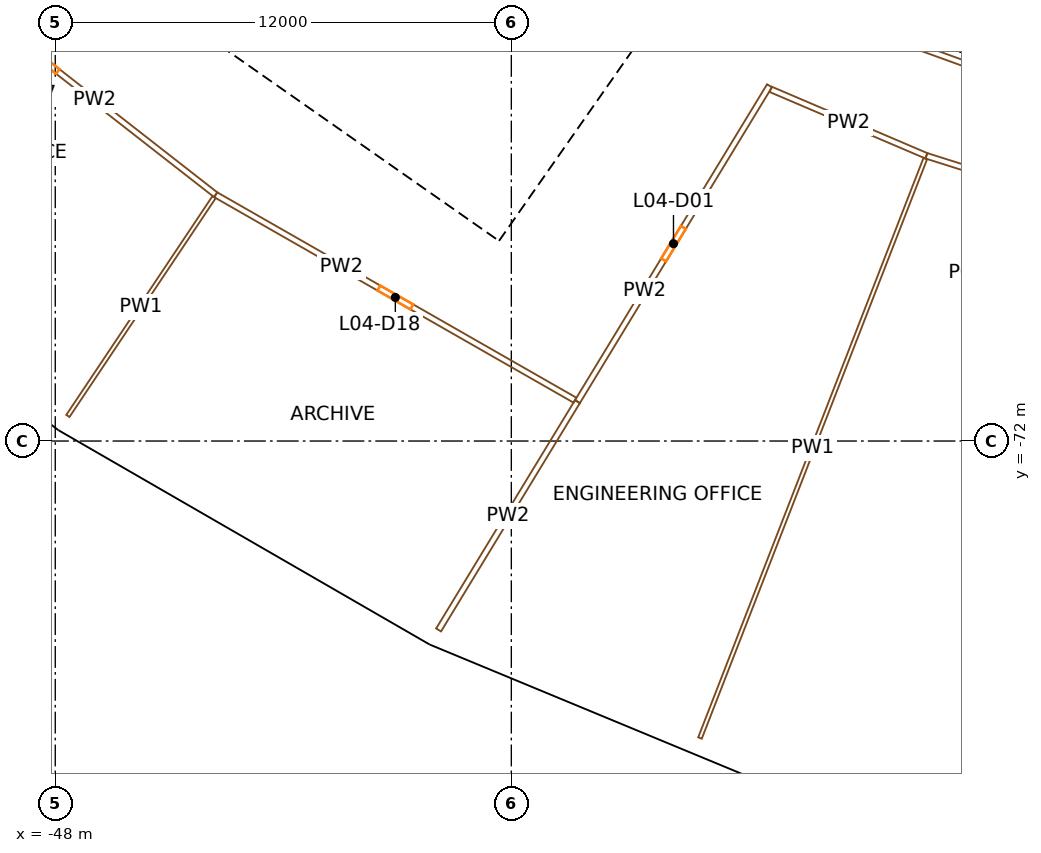
"""IFC4 building model, lengths in metres.
Left out: names, types, materials, properties, quantities, classifications, styles, units other than length and angle.
Written with IfcOpenShell. Run it as: python <this file> out.ifc"""

import sys

from ifc_helpers import new_model, si_unit, direction, frame, frame_2d, origin, origin_2d, place, context, subcontext, project, spatial, rectangle, extrude, element, fill, save


model = new_model("IFC4")
c1 = context("Model", 3, precision=1e-05, world=origin(), true_north=direction((0.0, 1.0)))
c2 = subcontext(c1, "Body", "Model", "MODEL_VIEW")
j1 = project(units=[si_unit("LENGTHUNIT", "METRE"), si_unit("PLANEANGLEUNIT", "RADIAN")], contexts=[c1])
p1 = place(None, origin())
s1 = spatial("IfcSite", under=j1, at=p1, CompositionType="ELEMENT")
p2 = place(p1, origin())
s2 = spatial("IfcBuilding", under=s1, at=p2, CompositionType="ELEMENT")
p3 = place(p2, frame((0.0, 0.0, 31.5)))
s3 = spatial("IfcBuildingStorey", under=s2, at=p3, CompositionType="ELEMENT", Elevation=31.5)
p4 = place(p3, frame((-43.196, -64.647, 0.0), z_axis=(0.0, 0.0, 1.0), x_axis=(0.831469612303, -0.55557023302, 0.0)))
e1 = element("IfcColumn", 1, at=p4, inside=s3, PredefinedType="COLUMN", context=c2, shape_type="SweptSolid", body=[
    extrude(rectangle(XDim=1.4, YDim=1.8, at=origin_2d()), origin(), (0.0, 0.0, 1.0), 4.5),
])
p5 = place(p3, frame((-47.362, -70.883, 0.0), z_axis=(0.0, 0.0, 1.0), x_axis=(0.831469612303, -0.55557023302, 0.0)))
e2 = element("IfcColumn", 2, at=p5, inside=s3, PredefinedType="COLUMN", context=c2, shape_type="SweptSolid", body=[
    extrude(rectangle(XDim=1.1, YDim=1.3, at=origin_2d()), origin(), (0.0, 0.0, 1.0), 4.5),
])
p6 = place(p3, frame((-34.388, -69.732, 0.0), z_axis=(0.0, 0.0, 1.0), x_axis=(0.896872741533, -0.442288690219, 0.0)))
e3 = element("IfcColumn", 3, at=p6, inside=s3, PredefinedType="COLUMN", context=c2, shape_type="SweptSolid", body=[
    extrude(rectangle(XDim=1.4, YDim=1.8, at=origin_2d()), origin(), (0.0, 0.0, 1.0), 4.5),
])
p7 = place(p3, frame((-37.705, -76.458, 0.0), z_axis=(0.0, 0.0, 1.0), x_axis=(0.896872741533, -0.442288690219, 0.0)))
e4 = element("IfcColumn", 4, at=p7, inside=s3, PredefinedType="COLUMN", context=c2, shape_type="SweptSolid", body=[
    extrude(rectangle(XDim=1.1, YDim=1.3, at=origin_2d()), origin(), (0.0, 0.0, 1.0), 4.5),
])
p8 = place(p3, frame((-24.992, -73.624, 0.0), z_axis=(0.0, 0.0, 1.0), x_axis=(0.946930129495, -0.321439465303, 0.0)))
e5 = element("IfcColumn", 5, at=p8, inside=s3, PredefinedType="COLUMN", context=c2, shape_type="SweptSolid", body=[
    extrude(rectangle(XDim=1.4, YDim=1.8, at=origin_2d()), origin(), (0.0, 0.0, 1.0), 4.5),
])
p9 = place(p3, frame((-27.403, -80.726, 0.0), z_axis=(0.0, 0.0, 1.0), x_axis=(0.946930129495, -0.321439465303, 0.0)))
e6 = element("IfcColumn", 6, at=p9, inside=s3, PredefinedType="COLUMN", context=c2, shape_type="SweptSolid", body=[
    extrude(rectangle(XDim=1.1, YDim=1.3, at=origin_2d()), origin(), (0.0, 0.0, 1.0), 4.5),
])
p10 = place(p3, frame((-36.717, -66.337, 0.0), z_axis=(0.0, 0.0, 1.0), x_axis=(0.573577477574, 0.819151315216, 0.0)))
e7 = element("IfcWall", 7, at=p10, inside=s3, PredefinedType="SHEAR", context=c2, shape_type="SweptSolid", body=[
    extrude(rectangle(XDim=14.8, YDim=0.9, at=frame_2d((7.4, 0.0))), origin(), (0.0, 0.0, 1.0), 4.1),
])
p11 = place(p10, frame((6.2, 0.0, 0.0)))
e8 = element("IfcOpeningElement", 8, at=p11, cuts=e7, PredefinedType="OPENING", context=c2, shape_type="SweptSolid", body=[
    extrude(rectangle(XDim=2.4, YDim=2.1, at=frame_2d((1.2, 1.05))), frame((0.0, 0.46, 0.0), z_axis=(0.0, -1.0, 0.0), x_axis=(1.0, 0.0, 0.0)), (0.0, 0.0, 1.0), 0.92),
])
p12 = place(p3, frame((-36.827, -65.71, 0.0), z_axis=(0.0, 0.0, 1.0), x_axis=(-0.819153391756, 0.573574511963, 0.0)))
e9 = element("IfcWall", 9, at=p12, inside=s3, PredefinedType="SHEAR", context=c2, shape_type="SweptSolid", body=[
    extrude(rectangle(XDim=15.045, YDim=0.9, at=frame_2d((7.523, 0.0))), origin(), (0.0, 0.0, 1.0), 4.1),
])
p13 = place(p12, frame((0.6, 0.0, 0.0)))
e10 = element("IfcOpeningElement", 10, at=p13, cuts=e9, PredefinedType="OPENING", context=c2, shape_type="SweptSolid", body=[
    extrude(rectangle(XDim=1.0, YDim=2.1, at=frame_2d((0.5, 1.05))), frame((0.0, 0.46, 0.0), z_axis=(0.0, -1.0, 0.0), x_axis=(1.0, 0.0, 0.0)), (0.0, 0.0, 1.0), 0.92),
])
p14 = place(p12, frame((3.275, 0.0, 0.0)))
e11 = element("IfcOpeningElement", 11, at=p14, cuts=e9, PredefinedType="OPENING", context=c2, shape_type="SweptSolid", body=[
    extrude(rectangle(XDim=1.0, YDim=2.1, at=frame_2d((0.5, 1.05))), frame((0.0, 0.46, 0.0), z_axis=(0.0, -1.0, 0.0), x_axis=(1.0, 0.0, 0.0)), (0.0, 0.0, 1.0), 0.92),
])
p15 = place(p12, frame((6.175, 0.0, 0.0)))
e12 = element("IfcOpeningElement", 12, at=p15, cuts=e9, PredefinedType="OPENING", context=c2, shape_type="SweptSolid", body=[
    extrude(rectangle(XDim=1.0, YDim=2.1, at=frame_2d((0.5, 1.05))), frame((0.0, 0.46, 0.0), z_axis=(0.0, -1.0, 0.0), x_axis=(1.0, 0.0, 0.0)), (0.0, 0.0, 1.0), 0.92),
])
p16 = place(p12, frame((13.495, 0.0, 0.0)))
e13 = element("IfcOpeningElement", 13, at=p16, cuts=e9, PredefinedType="OPENING", context=c2, shape_type="SweptSolid", body=[
    extrude(rectangle(XDim=1.1, YDim=2.1, at=frame_2d((0.55, 1.05))), frame((0.0, 0.46, 0.0), z_axis=(0.0, -1.0, 0.0), x_axis=(1.0, 0.0, 0.0)), (0.0, 0.0, 1.0), 0.92),
])
p17 = place(p3, frame((-35.221, -63.417, 0.0), z_axis=(0.0, 0.0, 1.0), x_axis=(-0.819166993208, 0.573555086491, 0.0)))
e14 = element("IfcWall", 14, at=p17, inside=s3, PredefinedType="SOLIDWALL", context=c2, shape_type="SweptSolid", body=[
    extrude(rectangle(XDim=7.95, YDim=0.3, at=frame_2d((3.975, 0.0))), origin(), (0.0, 0.0, 1.0), 4.1),
])
p18 = place(p3, frame((-35.635, -60.258, 0.0), z_axis=(0.0, 0.0, 1.0), x_axis=(-0.573581496053, -0.819148501424, 0.0)))
e15 = element("IfcWall", 15, at=p18, inside=s3, PredefinedType="PARTITIONING", context=c2, shape_type="SweptSolid", body=[
    extrude(rectangle(XDim=2.2, YDim=0.15, at=frame_2d((1.1, 0.0))), origin(), (0.0, 0.0, 1.0), 4.1),
])
for number, where, z_axis, x_axis in (
    (16, (-37.15, -62.249, 0.0), (0.0, 0.0, 1.0), (-0.574, -0.819, 0.0)),
    (17, (-39.649, -60.5, 0.0), (0.0, 0.0, 1.0), (-0.574, -0.819, 0.0)),
):
    element("IfcWall", number, at=place(p3, frame(where, z_axis=z_axis, x_axis=x_axis)), inside=s3, PredefinedType="PLUMBINGWALL", context=c2, shape_type="SweptSolid", body=[
        extrude(rectangle(XDim=2.2, YDim=0.1, at=frame_2d((1.1, 0.0))), origin(), (0.0, 0.0, 1.0), 4.1),
    ])
p19 = place(p3, frame((-56.673, -64.713, 0.0), z_axis=(0.0, 0.0, 1.0), x_axis=(0.793355377778, -0.608758773695, 0.0)))
e18 = element("IfcWall", 18, at=p19, inside=s3, PredefinedType="SOLIDWALL", context=c2, shape_type="SweptSolid", body=[
    extrude(rectangle(XDim=11.135, YDim=0.45, at=frame_2d((5.567, 0.0))), origin(), (0.0, 0.0, 1.0), 3.2),
])
p20 = place(p19, frame((3.917, 0.0, 0.9)))
e19 = element("IfcOpeningElement", 19, at=p20, cuts=e18, PredefinedType="OPENING", context=c2, shape_type="SweptSolid", body=[
    extrude(rectangle(XDim=1.2, YDim=2.15, at=frame_2d((0.6, 1.075))), frame((0.0, 0.235, 0.0), z_axis=(0.0, -1.0, 0.0), x_axis=(1.0, 0.0, 0.0)), (0.0, 0.0, 1.0), 0.47),
])
p21 = place(p19, frame((6.017, 0.0, 0.9)))
e20 = element("IfcOpeningElement", 20, at=p21, cuts=e18, PredefinedType="OPENING", context=c2, shape_type="SweptSolid", body=[
    extrude(rectangle(XDim=1.2, YDim=2.15, at=frame_2d((0.6, 1.075))), frame((0.0, 0.235, 0.0), z_axis=(0.0, -1.0, 0.0), x_axis=(1.0, 0.0, 0.0)), (0.0, 0.0, 1.0), 0.47),
])
p22 = place(p3, frame((-47.819, -71.512, 0.0), z_axis=(0.0, 0.0, 1.0), x_axis=(0.866024577697, -0.500001430823, 0.0)))
e21 = element("IfcWall", 21, at=p22, inside=s3, PredefinedType="SOLIDWALL", context=c2, shape_type="SweptSolid", body=[
    extrude(rectangle(XDim=11.312, YDim=0.45, at=frame_2d((5.656, 0.0))), origin(), (0.0, 0.0, 1.0), 3.2),
])
p23 = place(p22, frame((4.006, 0.0, 0.9)))
e22 = element("IfcOpeningElement", 22, at=p23, cuts=e21, PredefinedType="OPENING", context=c2, shape_type="SweptSolid", body=[
    extrude(rectangle(XDim=1.2, YDim=2.15, at=frame_2d((0.6, 1.075))), frame((0.0, 0.235, 0.0), z_axis=(0.0, -1.0, 0.0), x_axis=(1.0, 0.0, 0.0)), (0.0, 0.0, 1.0), 0.47),
])
p24 = place(p22, frame((6.106, 0.0, 0.9)))
e23 = element("IfcOpeningElement", 23, at=p24, cuts=e21, PredefinedType="OPENING", context=c2, shape_type="SweptSolid", body=[
    extrude(rectangle(XDim=1.2, YDim=2.15, at=frame_2d((0.6, 1.075))), frame((0.0, 0.235, 0.0), z_axis=(0.0, -1.0, 0.0), x_axis=(1.0, 0.0, 0.0)), (0.0, 0.0, 1.0), 0.47),
])
p25 = place(p3, frame((-37.993, -77.176, 0.0), z_axis=(0.0, 0.0, 1.0), x_axis=(0.923874126662, -0.382696482978, 0.0)))
e24 = element("IfcWall", 24, at=p25, inside=s3, PredefinedType="SOLIDWALL", context=c2, shape_type="SweptSolid", body=[
    extrude(rectangle(XDim=11.135, YDim=0.45, at=frame_2d((5.567, 0.0))), origin(), (0.0, 0.0, 1.0), 3.2),
])
p26 = place(p25, frame((3.917, 0.0, 0.9)))
e25 = element("IfcOpeningElement", 25, at=p26, cuts=e24, PredefinedType="OPENING", context=c2, shape_type="SweptSolid", body=[
    extrude(rectangle(XDim=1.2, YDim=2.15, at=frame_2d((0.6, 1.075))), frame((0.0, 0.235, 0.0), z_axis=(0.0, -1.0, 0.0), x_axis=(1.0, 0.0, 0.0)), (0.0, 0.0, 1.0), 0.47),
])
p27 = place(p25, frame((6.017, 0.0, 0.9)))
e26 = element("IfcOpeningElement", 26, at=p27, cuts=e24, PredefinedType="OPENING", context=c2, shape_type="SweptSolid", body=[
    extrude(rectangle(XDim=1.2, YDim=2.15, at=frame_2d((0.6, 1.075))), frame((0.0, 0.235, 0.0), z_axis=(0.0, -1.0, 0.0), x_axis=(1.0, 0.0, 0.0)), (0.0, 0.0, 1.0), 0.47),
])
p28 = place(p3, frame((-43.779, -65.52, 0.0), z_axis=(0.0, 0.0, 1.0), x_axis=(-0.788255221118, 0.615348443063, 0.0)))
e27 = element("IfcWall", 27, at=p28, inside=s3, PredefinedType="PARTITIONING", context=c2, shape_type="SweptSolid", body=[
    extrude(rectangle(XDim=11.542, YDim=0.15, at=frame_2d((5.771, 0.0))), origin(), (0.0, 0.0, 1.0), 3.1),
])
p29 = place(p28, frame((5.271, 0.0, 0.0)))
e28 = element("IfcOpeningElement", 28, at=p29, cuts=e27, PredefinedType="OPENING", context=c2, shape_type="SweptSolid", body=[
    extrude(rectangle(XDim=1.0, YDim=2.1, at=frame_2d((0.5, 1.05))), frame((0.0, 0.085, 0.0), z_axis=(0.0, -1.0, 0.0), x_axis=(1.0, 0.0, 0.0)), (0.0, 0.0, 1.0), 0.17),
])
p30 = place(p3, frame((-47.668, -71.34, 0.0), z_axis=(0.0, 0.0, 1.0), x_axis=(0.55558668503, 0.831458619185, 0.0)))
e29 = element("IfcWall", 29, at=p30, inside=s3, PredefinedType="PARTITIONING", context=c2, shape_type="SweptSolid", body=[
    extrude(rectangle(XDim=6.925, YDim=0.1, at=frame_2d((3.462, 0.0))), origin(), (0.0, 0.0, 1.0), 3.1),
])
p31 = place(p3, frame((-34.325, -70.925, 0.0), z_axis=(0.0, 0.0, 1.0), x_axis=(-0.868112049759, 0.496368279671, 0.0)))
e30 = element("IfcWall", 30, at=p31, inside=s3, PredefinedType="PARTITIONING", context=c2, shape_type="SweptSolid", body=[
    extrude(rectangle(XDim=10.89, YDim=0.15, at=frame_2d((5.445, 0.0))), origin(), (0.0, 0.0, 1.0), 3.1),
])
p32 = place(p31, frame((4.945, 0.0, 0.0)))
e31 = element("IfcOpeningElement", 31, at=p32, cuts=e30, PredefinedType="OPENING", context=c2, shape_type="SweptSolid", body=[
    extrude(rectangle(XDim=1.0, YDim=2.1, at=frame_2d((0.5, 1.05))), frame((0.0, 0.085, 0.0), z_axis=(0.0, -1.0, 0.0), x_axis=(1.0, 0.0, 0.0)), (0.0, 0.0, 1.0), 0.17),
])
p33 = place(p3, frame((-34.26, -70.963, 0.0), z_axis=(0.0, 0.0, 1.0), x_axis=(-0.519582317334, -0.854420397412, 0.0)))
e32 = element("IfcWall", 32, at=p33, inside=s3, PredefinedType="PARTITIONING", context=c2, shape_type="SweptSolid", body=[
    extrude(rectangle(XDim=7.032, YDim=0.15, at=frame_2d((3.516, 0.0))), origin(), (0.0, 0.0, 1.0), 3.1),
])
p34 = place(p3, frame((-31.035, -79.814, 0.0), z_axis=(0.0, 0.0, 1.0), x_axis=(0.362399453939, 0.932022872995, 0.0)))
e33 = element("IfcWall", 33, at=p34, inside=s3, PredefinedType="PARTITIONING", context=c2, shape_type="SweptSolid", body=[
    extrude(rectangle(XDim=16.361, YDim=0.1, at=frame_2d((8.18, 0.0))), origin(), (0.0, 0.0, 1.0), 3.1),
])
p35 = place(p3, frame((-29.207, -62.652, 0.0), z_axis=(0.0, 0.0, 1.0), x_axis=(-0.519573423316, -0.854425805897, 0.0)))
e34 = element("IfcWall", 34, at=p35, inside=s3, PredefinedType="PARTITIONING", context=c2, shape_type="SweptSolid", body=[
    extrude(rectangle(XDim=9.726, YDim=0.15, at=frame_2d((4.863, 0.0))), origin(), (0.0, 0.0, 1.0), 3.1),
])
p36 = place(p35, frame((4.363, 0.0, 0.0)))
e35 = element("IfcOpeningElement", 35, at=p36, cuts=e34, PredefinedType="OPENING", context=c2, shape_type="SweptSolid", body=[
    extrude(rectangle(XDim=1.0, YDim=2.1, at=frame_2d((0.5, 1.05))), frame((0.0, 0.085, 0.0), z_axis=(0.0, -1.0, 0.0), x_axis=(1.0, 0.0, 0.0)), (0.0, 0.0, 1.0), 0.17),
])
p37 = place(p3, frame((-29.177, -62.746, 0.0), z_axis=(0.0, 0.0, 1.0), x_axis=(0.91966288709, -0.392708765001, 0.0)))
e36 = element("IfcWall", 36, at=p37, inside=s3, PredefinedType="PARTITIONING", context=c2, shape_type="SweptSolid", body=[
    extrude(rectangle(XDim=4.456, YDim=0.15, at=frame_2d((2.228, 0.0))), origin(), (0.0, 0.0, 1.0), 3.1),
])
p38 = place(p3, frame((-27.92, -60.678, 0.0), z_axis=(0.0, 0.0, 1.0), x_axis=(0.940369024046, -0.340155991589, 0.0)))
e37 = element("IfcWall", 37, at=p38, inside=s3, PredefinedType="PARTITIONING", context=c2, shape_type="SweptSolid", body=[
    extrude(rectangle(XDim=11.305, YDim=0.15, at=frame_2d((5.652, 0.0))), origin(), (0.0, 0.0, 1.0), 3.1),
])
p39 = place(p38, frame((4.752, 0.0, 0.0)))
e38 = element("IfcOpeningElement", 38, at=p39, cuts=e37, PredefinedType="OPENING", context=c2, shape_type="SweptSolid", body=[
    extrude(rectangle(XDim=1.8, YDim=2.1, at=frame_2d((0.9, 1.05))), frame((0.0, 0.085, 0.0), z_axis=(0.0, -1.0, 0.0), x_axis=(1.0, 0.0, 0.0)), (0.0, 0.0, 1.0), 0.17),
])
p40 = place(p3, frame((-16.446, -67.217, 0.0), z_axis=(0.0, 0.0, 1.0), x_axis=(-0.953724416281, 0.300682120834, 0.0)))
e39 = element("IfcWall", 39, at=p40, inside=s3, PredefinedType="PARTITIONING", context=c2, shape_type="SweptSolid", body=[
    extrude(rectangle(XDim=9.052, YDim=0.15, at=frame_2d((4.526, 0.0))), origin(), (0.0, 0.0, 1.0), 3.1),
])
p41 = place(p40, frame((3.626, 0.0, 0.0)))
e40 = element("IfcOpeningElement", 40, at=p41, cuts=e39, PredefinedType="OPENING", context=c2, shape_type="SweptSolid", body=[
    extrude(rectangle(XDim=1.8, YDim=2.1, at=frame_2d((0.9, 1.05))), frame((0.0, 0.085, 0.0), z_axis=(0.0, -1.0, 0.0), x_axis=(1.0, 0.0, 0.0)), (0.0, 0.0, 1.0), 0.17),
])
p42 = place(p13, origin())
e41 = element("IfcDoor", 41, at=p42, inside=s3, OperationType="SINGLE_SWING_RIGHT", PredefinedType="DOOR", context=c2, shape_type="SweptSolid", body=[
    extrude(rectangle(XDim=1.0, YDim=2.1, at=frame_2d((0.5, 1.05))), frame((0.0, 0.025, 0.0), z_axis=(0.0, -1.0, 0.0), x_axis=(1.0, 0.0, 0.0)), (0.0, 0.0, 1.0), 0.05),
])
fill(e10, e41)
p43 = place(p14, origin())
e42 = element("IfcDoor", 42, at=p43, inside=s3, OperationType="SINGLE_SWING_LEFT", PredefinedType="DOOR", context=c2, shape_type="SweptSolid", body=[
    extrude(rectangle(XDim=1.0, YDim=2.1, at=frame_2d((0.5, 1.05))), frame((0.0, 0.025, 0.0), z_axis=(0.0, -1.0, 0.0), x_axis=(1.0, 0.0, 0.0)), (0.0, 0.0, 1.0), 0.05),
])
fill(e11, e42)
p44 = place(p15, origin())
e43 = element("IfcDoor", 43, at=p44, inside=s3, OperationType="SINGLE_SWING_RIGHT", PredefinedType="DOOR", context=c2, shape_type="SweptSolid", body=[
    extrude(rectangle(XDim=1.0, YDim=2.1, at=frame_2d((0.5, 1.05))), frame((0.0, 0.025, 0.0), z_axis=(0.0, -1.0, 0.0), x_axis=(1.0, 0.0, 0.0)), (0.0, 0.0, 1.0), 0.05),
])
fill(e12, e43)
p45 = place(p23, origin())
e44 = element("IfcWindow", 44, at=p45, inside=s3, PartitioningType="SINGLE_PANEL", PredefinedType="WINDOW", context=c2, shape_type="SweptSolid", body=[
    extrude(rectangle(XDim=1.2, YDim=2.15, at=frame_2d((0.6, 1.075))), frame((0.0, 0.03, 0.0), z_axis=(0.0, -1.0, 0.0), x_axis=(1.0, 0.0, 0.0)), (0.0, 0.0, 1.0), 0.06),
])
fill(e22, e44)
p46 = place(p24, origin())
e45 = element("IfcWindow", 45, at=p46, inside=s3, PartitioningType="SINGLE_PANEL", PredefinedType="WINDOW", context=c2, shape_type="SweptSolid", body=[
    extrude(rectangle(XDim=1.2, YDim=2.15, at=frame_2d((0.6, 1.075))), frame((0.0, 0.03, 0.0), z_axis=(0.0, -1.0, 0.0), x_axis=(1.0, 0.0, 0.0)), (0.0, 0.0, 1.0), 0.06),
])
fill(e23, e45)
p47 = place(p26, origin())
e46 = element("IfcWindow", 46, at=p47, inside=s3, PartitioningType="SINGLE_PANEL", PredefinedType="WINDOW", context=c2, shape_type="SweptSolid", body=[
    extrude(rectangle(XDim=1.2, YDim=2.15, at=frame_2d((0.6, 1.075))), frame((0.0, 0.03, 0.0), z_axis=(0.0, -1.0, 0.0), x_axis=(1.0, 0.0, 0.0)), (0.0, 0.0, 1.0), 0.06),
])
fill(e25, e46)
p48 = place(p27, origin())
e47 = element("IfcWindow", 47, at=p48, inside=s3, PartitioningType="SINGLE_PANEL", PredefinedType="WINDOW", context=c2, shape_type="SweptSolid", body=[
    extrude(rectangle(XDim=1.2, YDim=2.15, at=frame_2d((0.6, 1.075))), frame((0.0, 0.03, 0.0), z_axis=(0.0, -1.0, 0.0), x_axis=(1.0, 0.0, 0.0)), (0.0, 0.0, 1.0), 0.06),
])
fill(e26, e47)
p49 = place(p36, origin())
e48 = element("IfcDoor", 48, at=p49, inside=s3, OperationType="SINGLE_SWING_RIGHT", PredefinedType="DOOR", context=c2, shape_type="SweptSolid", body=[
    extrude(rectangle(XDim=1.0, YDim=2.1, at=frame_2d((0.5, 1.05))), frame((0.0, 0.025, 0.0), z_axis=(0.0, -1.0, 0.0), x_axis=(1.0, 0.0, 0.0)), (0.0, 0.0, 1.0), 0.05),
])
fill(e35, e48)
p50 = place(p29, origin())
e49 = element("IfcDoor", 49, at=p50, inside=s3, OperationType="SINGLE_SWING_RIGHT", PredefinedType="DOOR", context=c2, shape_type="SweptSolid", body=[
    extrude(rectangle(XDim=1.0, YDim=2.1, at=frame_2d((0.5, 1.05))), frame((0.0, 0.025, 0.0), z_axis=(0.0, -1.0, 0.0), x_axis=(1.0, 0.0, 0.0)), (0.0, 0.0, 1.0), 0.05),
])
fill(e28, e49)
p51 = place(p32, origin())
e50 = element("IfcDoor", 50, at=p51, inside=s3, OperationType="SINGLE_SWING_RIGHT", PredefinedType="DOOR", context=c2, shape_type="SweptSolid", body=[
    extrude(rectangle(XDim=1.0, YDim=2.1, at=frame_2d((0.5, 1.05))), frame((0.0, 0.025, 0.0), z_axis=(0.0, -1.0, 0.0), x_axis=(1.0, 0.0, 0.0)), (0.0, 0.0, 1.0), 0.05),
])
fill(e31, e50)
save(model, sys.argv[1])
